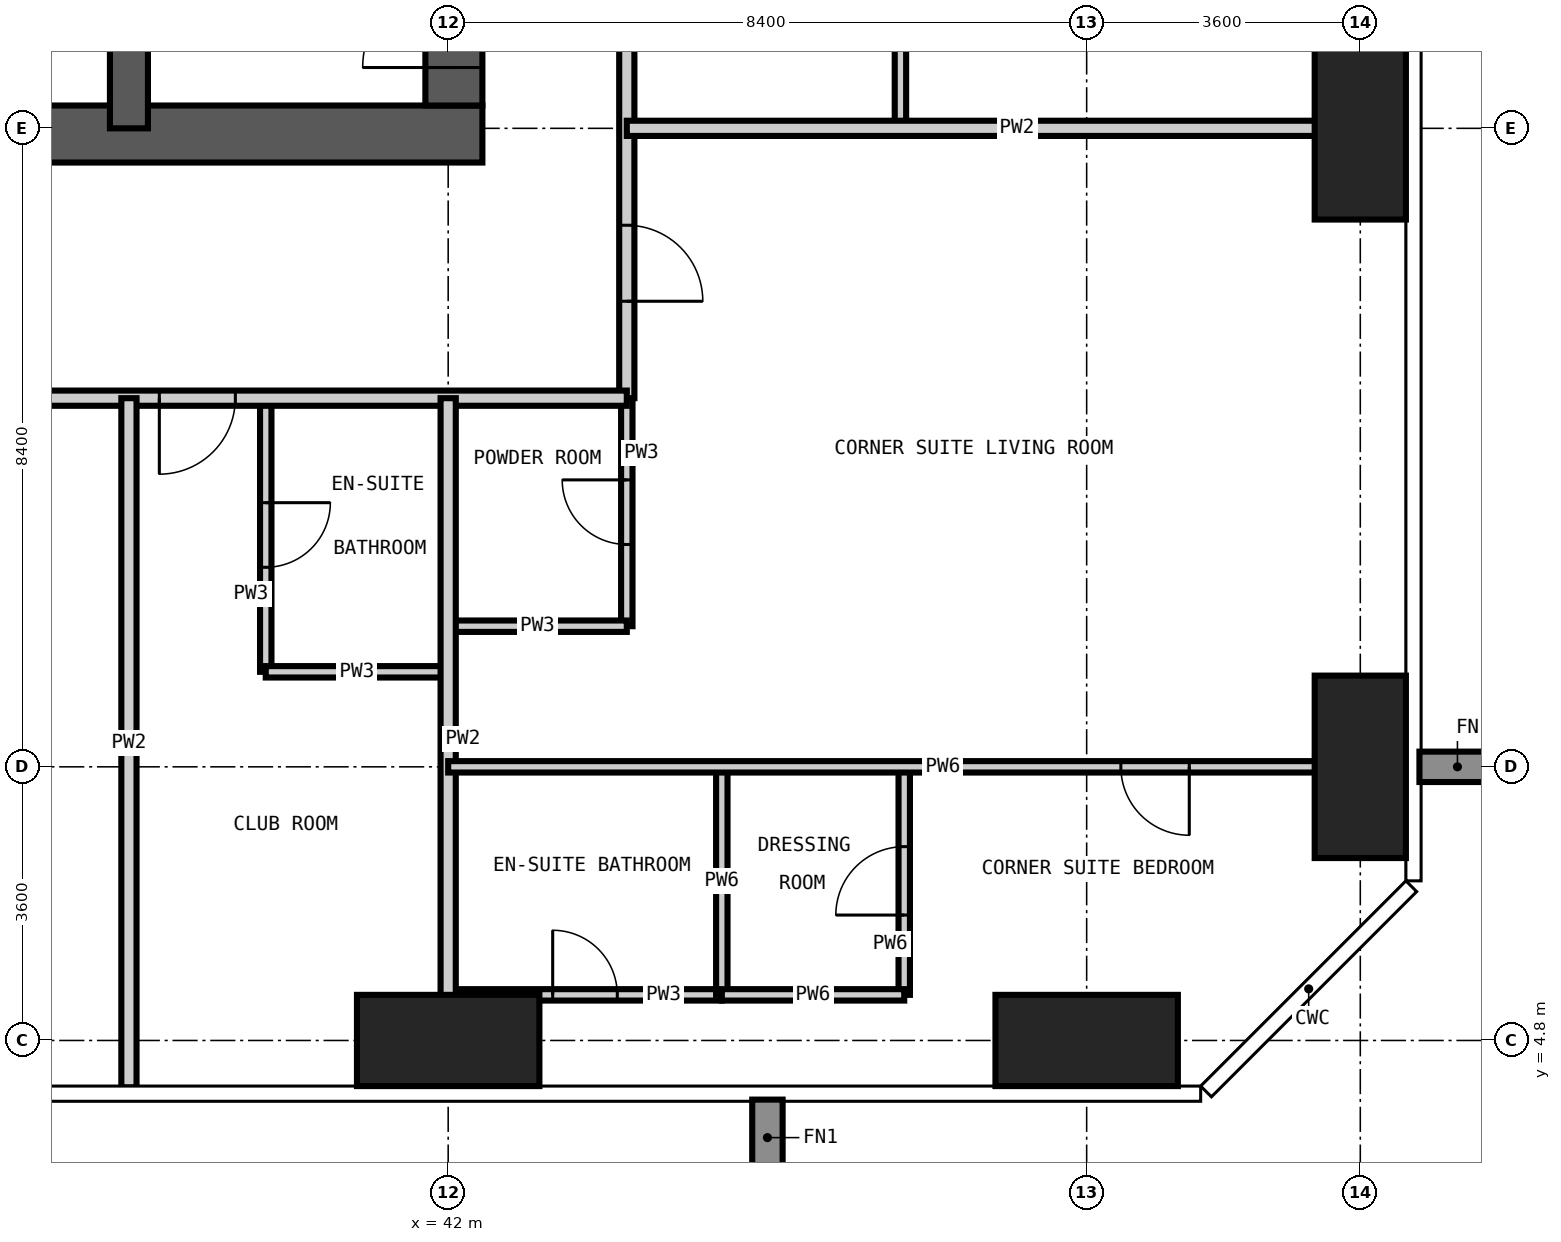
"""IFC4 building model, lengths in metres.
Left out: names, types, materials, properties, quantities, classifications, styles, units other than length and angle.
Written with IfcOpenShell. Run it as: python <this file> out.ifc"""

import sys

from ifc_helpers import new_model, si_unit, direction, frame, frame_2d, origin, origin_2d, place, context, subcontext, project, spatial, rectangle, extrude, element, fill, save


model = new_model("IFC4")
c1 = context("Model", 3, precision=1e-05, world=origin(), true_north=direction((0.0, 1.0)))
c2 = subcontext(c1, "Body", "Model", "MODEL_VIEW")
j1 = project(units=[si_unit("LENGTHUNIT", "METRE"), si_unit("PLANEANGLEUNIT", "RADIAN")], contexts=[c1])
p1 = place(None, origin())
s1 = spatial("IfcSite", under=j1, at=p1, CompositionType="ELEMENT")
p2 = place(p1, origin())
s2 = spatial("IfcBuilding", under=s1, at=p2, CompositionType="ELEMENT")
p3 = place(p2, frame((0.0, 0.0, 166.2)))
s3 = spatial("IfcBuildingStorey", under=s2, at=p3, CompositionType="ELEMENT", Elevation=166.2)
for number, where, z_axis, x_axis in (
    (1, (42.0, 4.8, -0.35), (0.0, 0.0, 1.0), (1.0, 0.0, 0.0)),
    (2, (50.4, 4.8, -0.35), (0.0, 0.0, 1.0), (1.0, 0.0, 0.0)),
):
    element("IfcColumn", number, at=place(p3, frame(where, z_axis=z_axis, x_axis=x_axis)), inside=s3, PredefinedType="COLUMN", context=c2, shape_type="SweptSolid", body=[
        extrude(rectangle(XDim=2.4, YDim=1.2, at=origin_2d()), origin(), (0.0, 0.0, 1.0), 3.6),
    ])
for number, where, z_axis, x_axis in (
    (3, (54.0, 8.4, -0.35), (0.0, 0.0, 1.0), (1.0, 0.0, 0.0)),
    (4, (54.0, 16.8, -0.35), (0.0, 0.0, 1.0), (1.0, 0.0, 0.0)),
):
    element("IfcColumn", number, at=place(p3, frame(where, z_axis=z_axis, x_axis=x_axis)), inside=s3, PredefinedType="COLUMN", context=c2, shape_type="SweptSolid", body=[
        extrude(rectangle(XDim=1.2, YDim=2.4, at=origin_2d()), origin(), (0.0, 0.0, 1.0), 3.6),
    ])
p4 = place(p3, frame((16.35, 16.725, -0.35), z_axis=(0.0, 0.0, 1.0), x_axis=(1.0, 0.0, 0.0)))
e5 = element("IfcWall", 5, at=p4, inside=s3, PredefinedType="SHEAR", context=c2, shape_type="SweptSolid", body=[
    extrude(rectangle(XDim=26.1, YDim=0.75, at=frame_2d((13.05, 0.0))), origin(), (0.0, 0.0, 1.0), 3.6),
])
p5 = place(p4, frame((12.55, 0.0, 0.35)))
e6 = element("IfcOpeningElement", 6, at=p5, cuts=e5, PredefinedType="OPENING", context=c2, shape_type="SweptSolid", body=[
    extrude(rectangle(XDim=1.0, YDim=2.1, at=frame_2d((0.5, 1.05))), frame((0.0, 0.385, 0.0), z_axis=(0.0, -1.0, 0.0), x_axis=(1.0, 0.0, 0.0)), (0.0, 0.0, 1.0), 0.77),
])
p6 = place(p4, frame((18.85, 0.0, 0.35)))
e7 = element("IfcOpeningElement", 7, at=p6, cuts=e5, PredefinedType="OPENING", context=c2, shape_type="SweptSolid", body=[
    extrude(rectangle(XDim=1.0, YDim=2.1, at=frame_2d((0.5, 1.05))), frame((0.0, 0.385, 0.0), z_axis=(0.0, -1.0, 0.0), x_axis=(1.0, 0.0, 0.0)), (0.0, 0.0, 1.0), 0.77),
])
p7 = place(p3, frame((42.075, 17.1, -0.35), z_axis=(0.0, 0.0, 1.0), x_axis=(0.0, 1.0, 0.0)))
e8 = element("IfcWall", 8, at=p7, inside=s3, PredefinedType="SHEAR", context=c2, shape_type="SweptSolid", body=[
    extrude(rectangle(XDim=24.6, YDim=0.75, at=frame_2d((12.3, 0.0))), origin(), (0.0, 0.0, 1.0), 3.6),
])
p8 = place(p7, frame((0.5, 0.0, 0.35)))
e9 = element("IfcOpeningElement", 9, at=p8, cuts=e8, PredefinedType="OPENING", context=c2, shape_type="SweptSolid", body=[
    extrude(rectangle(XDim=1.2, YDim=2.2, at=frame_2d((0.6, 1.1))), frame((0.0, 0.385, 0.0), z_axis=(0.0, -1.0, 0.0), x_axis=(1.0, 0.0, 0.0)), (0.0, 0.0, 1.0), 0.77),
])
p9 = place(p7, frame((11.8, 0.0, 0.35)))
e10 = element("IfcOpeningElement", 10, at=p9, cuts=e8, PredefinedType="OPENING", context=c2, shape_type="SweptSolid", body=[
    extrude(rectangle(XDim=1.0, YDim=2.1, at=frame_2d((0.5, 1.05))), frame((0.0, 0.385, 0.0), z_axis=(0.0, -1.0, 0.0), x_axis=(1.0, 0.0, 0.0)), (0.0, 0.0, 1.0), 0.77),
])
p10 = place(p7, frame((20.2, 0.0, 0.35)))
e11 = element("IfcOpeningElement", 11, at=p10, cuts=e8, PredefinedType="OPENING", context=c2, shape_type="SweptSolid", body=[
    extrude(rectangle(XDim=1.0, YDim=2.1, at=frame_2d((0.5, 1.05))), frame((0.0, 0.385, 0.0), z_axis=(0.0, -1.0, 0.0), x_axis=(1.0, 0.0, 0.0)), (0.0, 0.0, 1.0), 0.77),
])
p11 = place(p3, frame((37.8, 16.8, -0.35), z_axis=(0.0, 0.0, 1.0), x_axis=(0.0, 1.0, 0.0)))
e12 = element("IfcWall", 12, at=p11, inside=s3, PredefinedType="SHEAR", context=c2, shape_type="SweptSolid", body=[
    extrude(rectangle(XDim=11.2, YDim=0.5, at=frame_2d((5.6, 0.0))), origin(), (0.0, 0.0, 1.0), 3.6),
])
p12 = place(p3, frame((39.6, 9.65, 0.0), z_axis=(0.0, 0.0, 1.0), x_axis=(0.0, 1.0, 0.0)))
e13 = element("IfcWall", 13, at=p12, inside=s3, PredefinedType="PARTITIONING", context=c2, shape_type="SweptSolid", body=[
    extrude(rectangle(XDim=3.6, YDim=0.15, at=frame_2d((1.8, 0.0))), origin(), (0.0, 0.0, 1.0), 3.25),
])
p13 = place(p12, frame((1.375, 0.0, 0.0)))
e14 = element("IfcOpeningElement", 14, at=p13, cuts=e13, PredefinedType="OPENING", context=c2, shape_type="SweptSolid", body=[
    extrude(rectangle(XDim=0.85, YDim=2.1, at=frame_2d((0.425, 1.05))), frame((0.0, 0.085, 0.0), z_axis=(0.0, -1.0, 0.0), x_axis=(1.0, 0.0, 0.0)), (0.0, 0.0, 1.0), 0.17),
])
p14 = place(p3, frame((44.35, 10.25, 0.0), z_axis=(0.0, 0.0, 1.0), x_axis=(0.0, 1.0, 0.0)))
e15 = element("IfcWall", 15, at=p14, inside=s3, PredefinedType="PARTITIONING", context=c2, shape_type="SweptSolid", body=[
    extrude(rectangle(XDim=3.0, YDim=0.15, at=frame_2d((1.5, 0.0))), origin(), (0.0, 0.0, 1.0), 3.25),
])
p15 = place(p14, frame((1.075, 0.0, 0.0)))
e16 = element("IfcOpeningElement", 16, at=p15, cuts=e15, PredefinedType="OPENING", context=c2, shape_type="SweptSolid", body=[
    extrude(rectangle(XDim=0.85, YDim=2.1, at=frame_2d((0.425, 1.05))), frame((0.0, 0.085, 0.0), z_axis=(0.0, -1.0, 0.0), x_axis=(1.0, 0.0, 0.0)), (0.0, 0.0, 1.0), 0.17),
])
p16 = place(p3, frame((47.95, 16.8, 0.0), z_axis=(0.0, 0.0, 1.0), x_axis=(0.0, 1.0, 0.0)))
e17 = element("IfcWall", 17, at=p16, inside=s3, PredefinedType="PARTITIONING", context=c2, shape_type="SweptSolid", body=[
    extrude(rectangle(XDim=2.4, YDim=0.15, at=frame_2d((1.2, 0.0))), origin(), (0.0, 0.0, 1.0), 3.25),
])
p17 = place(p3, frame((42.0, 5.4, 0.0), z_axis=(0.0, 0.0, 1.0), x_axis=(1.0, 0.0, 0.0)))
e18 = element("IfcWall", 18, at=p17, inside=s3, PredefinedType="PARTITIONING", context=c2, shape_type="SweptSolid", body=[
    extrude(rectangle(XDim=3.6, YDim=0.15, at=frame_2d((1.8, 0.0))), origin(), (0.0, 0.0, 1.0), 3.25),
])
p18 = place(p17, frame((1.375, 0.0, 0.0)))
e19 = element("IfcOpeningElement", 19, at=p18, cuts=e18, PredefinedType="OPENING", context=c2, shape_type="SweptSolid", body=[
    extrude(rectangle(XDim=0.85, YDim=2.1, at=frame_2d((0.425, 1.05))), frame((0.0, 0.085, 0.0), z_axis=(0.0, -1.0, 0.0), x_axis=(1.0, 0.0, 0.0)), (0.0, 0.0, 1.0), 0.17),
])
p19 = place(p3, frame((39.6, 9.65, 0.0), z_axis=(0.0, 0.0, 1.0), x_axis=(1.0, 0.0, 0.0)))
e20 = element("IfcWall", 20, at=p19, inside=s3, PredefinedType="PARTITIONING", context=c2, shape_type="SweptSolid", body=[
    extrude(rectangle(XDim=2.4, YDim=0.15, at=frame_2d((1.2, 0.0))), origin(), (0.0, 0.0, 1.0), 3.25),
])
p20 = place(p3, frame((42.0, 10.25, 0.0), z_axis=(0.0, 0.0, 1.0), x_axis=(1.0, 0.0, 0.0)))
e21 = element("IfcWall", 21, at=p20, inside=s3, PredefinedType="PARTITIONING", context=c2, shape_type="SweptSolid", body=[
    extrude(rectangle(XDim=2.35, YDim=0.15, at=frame_2d((1.175, 0.0))), origin(), (0.0, 0.0, 1.0), 3.25),
])
p21 = place(p3, frame((44.35, 25.2, 0.0), z_axis=(0.0, 0.0, 1.0), x_axis=(0.0, -1.0, 0.0)))
e22 = element("IfcWall", 22, at=p21, inside=s3, PredefinedType="PARTITIONING", context=c2, shape_type="SweptSolid", body=[
    extrude(rectangle(XDim=11.95, YDim=0.2, at=frame_2d((5.975, 0.0))), origin(), (0.0, 0.0, 1.0), 3.25),
])
p22 = place(p21, frame((4.6, 0.0, 0.0)))
e23 = element("IfcOpeningElement", 23, at=p22, cuts=e22, PredefinedType="OPENING", context=c2, shape_type="SweptSolid", body=[
    extrude(rectangle(XDim=1.0, YDim=2.2, at=frame_2d((0.5, 1.1))), frame((0.0, 0.11, 0.0), z_axis=(0.0, -1.0, 0.0), x_axis=(1.0, 0.0, 0.0)), (0.0, 0.0, 1.0), 0.22),
])
p23 = place(p21, frame((2.8, 0.0, 0.0)))
e24 = element("IfcOpeningElement", 24, at=p23, cuts=e22, PredefinedType="OPENING", context=c2, shape_type="SweptSolid", body=[
    extrude(rectangle(XDim=1.0, YDim=2.2, at=frame_2d((0.5, 1.1))), frame((0.0, 0.11, 0.0), z_axis=(0.0, -1.0, 0.0), x_axis=(1.0, 0.0, 0.0)), (0.0, 0.0, 1.0), 0.22),
])
p24 = place(p21, frame((9.675, 0.0, 0.0)))
e25 = element("IfcOpeningElement", 25, at=p24, cuts=e22, PredefinedType="OPENING", context=c2, shape_type="SweptSolid", body=[
    extrude(rectangle(XDim=1.0, YDim=2.2, at=frame_2d((0.5, 1.1))), frame((0.0, 0.11, 0.0), z_axis=(0.0, -1.0, 0.0), x_axis=(1.0, 0.0, 0.0)), (0.0, 0.0, 1.0), 0.22),
])
p25 = place(p3, frame((44.35, 13.25, 0.0), z_axis=(0.0, 0.0, 1.0), x_axis=(-1.0, 0.0, 0.0)))
e26 = element("IfcWall", 26, at=p25, inside=s3, PredefinedType="PARTITIONING", context=c2, shape_type="SweptSolid", body=[
    extrude(rectangle(XDim=31.1, YDim=0.2, at=frame_2d((15.55, 0.0))), origin(), (0.0, 0.0, 1.0), 3.25),
])
p26 = place(p25, frame((23.75, 0.0, 0.0)))
e27 = element("IfcOpeningElement", 27, at=p26, cuts=e26, PredefinedType="OPENING", context=c2, shape_type="SweptSolid", body=[
    extrude(rectangle(XDim=1.0, YDim=2.2, at=frame_2d((0.5, 1.1))), frame((0.0, 0.11, 0.0), z_axis=(0.0, -1.0, 0.0), x_axis=(1.0, 0.0, 0.0)), (0.0, 0.0, 1.0), 0.22),
])
p27 = place(p25, frame((20.0, 0.0, 0.0)))
e28 = element("IfcOpeningElement", 28, at=p27, cuts=e26, PredefinedType="OPENING", context=c2, shape_type="SweptSolid", body=[
    extrude(rectangle(XDim=1.0, YDim=2.2, at=frame_2d((0.5, 1.1))), frame((0.0, 0.11, 0.0), z_axis=(0.0, -1.0, 0.0), x_axis=(1.0, 0.0, 0.0)), (0.0, 0.0, 1.0), 0.22),
])
p28 = place(p25, frame((8.9, 0.0, 0.0)))
e29 = element("IfcOpeningElement", 29, at=p28, cuts=e26, PredefinedType="OPENING", context=c2, shape_type="SweptSolid", body=[
    extrude(rectangle(XDim=1.0, YDim=2.2, at=frame_2d((0.5, 1.1))), frame((0.0, 0.11, 0.0), z_axis=(0.0, -1.0, 0.0), x_axis=(1.0, 0.0, 0.0)), (0.0, 0.0, 1.0), 0.22),
])
p29 = place(p25, frame((5.15, 0.0, 0.0)))
e30 = element("IfcOpeningElement", 30, at=p29, cuts=e26, PredefinedType="OPENING", context=c2, shape_type="SweptSolid", body=[
    extrude(rectangle(XDim=1.0, YDim=2.2, at=frame_2d((0.5, 1.1))), frame((0.0, 0.11, 0.0), z_axis=(0.0, -1.0, 0.0), x_axis=(1.0, 0.0, 0.0)), (0.0, 0.0, 1.0), 0.22),
])
for number, where, z_axis, x_axis in (
    (31, (37.8, 4.182, 0.0), (0.0, 0.0, 1.0), (0.0, 1.0, 0.0)),
    (32, (42.0, 4.182, 0.0), (0.0, 0.0, 1.0), (0.0, 1.0, 0.0)),
):
    element("IfcWall", number, at=place(p3, frame(where, z_axis=z_axis, x_axis=x_axis)), inside=s3, PredefinedType="PARTITIONING", context=c2, shape_type="SweptSolid", body=[
        extrude(rectangle(XDim=9.068, YDim=0.2, at=frame_2d((4.534, 0.0))), origin(), (0.0, 0.0, 1.0), 3.25),
    ])
p30 = place(p3, frame((44.35, 16.8, 0.0), z_axis=(0.0, 0.0, 1.0), x_axis=(1.0, 0.0, 0.0)))
e33 = element("IfcWall", 33, at=p30, inside=s3, PredefinedType="PARTITIONING", context=c2, shape_type="SweptSolid", body=[
    extrude(rectangle(XDim=10.268, YDim=0.2, at=frame_2d((5.134, 0.0))), origin(), (0.0, 0.0, 1.0), 3.25),
])
p31 = place(p3, frame((45.6, 5.4, 0.0), z_axis=(0.0, 0.0, 1.0), x_axis=(0.0, 1.0, 0.0)))
e34 = element("IfcWall", 34, at=p31, inside=s3, PredefinedType="PARTITIONING", context=c2, shape_type="SweptSolid", body=[
    extrude(rectangle(XDim=3.0, YDim=0.15, at=frame_2d((1.5, 0.0))), origin(), (0.0, 0.0, 1.0), 3.25),
])
p32 = place(p3, frame((48.0, 5.4, 0.0), z_axis=(0.0, 0.0, 1.0), x_axis=(0.0, 1.0, 0.0)))
e35 = element("IfcWall", 35, at=p32, inside=s3, PredefinedType="PARTITIONING", context=c2, shape_type="SweptSolid", body=[
    extrude(rectangle(XDim=3.0, YDim=0.15, at=frame_2d((1.5, 0.0))), origin(), (0.0, 0.0, 1.0), 3.25),
])
p33 = place(p32, frame((1.05, 0.0, 0.0)))
e36 = element("IfcOpeningElement", 36, at=p33, cuts=e35, PredefinedType="OPENING", context=c2, shape_type="SweptSolid", body=[
    extrude(rectangle(XDim=0.9, YDim=2.1, at=frame_2d((0.45, 1.05))), frame((0.0, 0.085, 0.0), z_axis=(0.0, -1.0, 0.0), x_axis=(1.0, 0.0, 0.0)), (0.0, 0.0, 1.0), 0.17),
])
p34 = place(p3, frame((45.6, 5.4, 0.0), z_axis=(0.0, 0.0, 1.0), x_axis=(1.0, 0.0, 0.0)))
e37 = element("IfcWall", 37, at=p34, inside=s3, PredefinedType="PARTITIONING", context=c2, shape_type="SweptSolid", body=[
    extrude(rectangle(XDim=2.4, YDim=0.15, at=frame_2d((1.2, 0.0))), origin(), (0.0, 0.0, 1.0), 3.25),
])
p35 = place(p3, frame((42.0, 8.4, 0.0), z_axis=(0.0, 0.0, 1.0), x_axis=(1.0, 0.0, 0.0)))
e38 = element("IfcWall", 38, at=p35, inside=s3, PredefinedType="PARTITIONING", context=c2, shape_type="SweptSolid", body=[
    extrude(rectangle(XDim=12.618, YDim=0.15, at=frame_2d((6.309, 0.0))), origin(), (0.0, 0.0, 1.0), 3.25),
])
p36 = place(p35, frame((8.85, 0.0, 0.0)))
e39 = element("IfcOpeningElement", 39, at=p36, cuts=e38, PredefinedType="OPENING", context=c2, shape_type="SweptSolid", body=[
    extrude(rectangle(XDim=0.9, YDim=2.1, at=frame_2d((0.45, 1.05))), frame((0.0, 0.085, 0.0), z_axis=(0.0, -1.0, 0.0), x_axis=(1.0, 0.0, 0.0)), (0.0, 0.0, 1.0), 0.17),
])
p37 = place(p8, origin())
e40 = element("IfcDoor", 40, at=p37, inside=s3, OperationType="SINGLE_SWING_LEFT", PredefinedType="DOOR", context=c2, shape_type="SweptSolid", body=[
    extrude(rectangle(XDim=1.2, YDim=2.2, at=frame_2d((0.6, 1.1))), frame((0.0, 0.025, 0.0), z_axis=(0.0, -1.0, 0.0), x_axis=(1.0, 0.0, 0.0)), (0.0, 0.0, 1.0), 0.05),
])
fill(e9, e40)
p38 = place(p29, origin())
e41 = element("IfcDoor", 41, at=p38, inside=s3, OperationType="SINGLE_SWING_RIGHT", PredefinedType="DOOR", context=c2, shape_type="SweptSolid", body=[
    extrude(rectangle(XDim=1.0, YDim=2.2, at=frame_2d((0.5, 1.1))), frame((0.0, 0.025, 0.0), z_axis=(0.0, -1.0, 0.0), x_axis=(1.0, 0.0, 0.0)), (0.0, 0.0, 1.0), 0.05),
])
fill(e30, e41)
p39 = place(p13, frame((0.85, 0.0, 0.0), z_axis=(0.0, 0.0, 1.0), x_axis=(-1.0, 0.0, 0.0)))
e42 = element("IfcDoor", 42, at=p39, inside=s3, OperationType="SINGLE_SWING_LEFT", PredefinedType="DOOR", context=c2, shape_type="SweptSolid", body=[
    extrude(rectangle(XDim=0.85, YDim=2.1, at=frame_2d((0.425, 1.05))), frame((0.0, 0.025, 0.0), z_axis=(0.0, -1.0, 0.0), x_axis=(1.0, 0.0, 0.0)), (0.0, 0.0, 1.0), 0.05),
])
fill(e14, e42)
p40 = place(p24, origin())
e43 = element("IfcDoor", 43, at=p40, inside=s3, OperationType="SINGLE_SWING_RIGHT", PredefinedType="DOOR", context=c2, shape_type="SweptSolid", body=[
    extrude(rectangle(XDim=1.0, YDim=2.2, at=frame_2d((0.5, 1.1))), frame((0.0, 0.025, 0.0), z_axis=(0.0, -1.0, 0.0), x_axis=(1.0, 0.0, 0.0)), (0.0, 0.0, 1.0), 0.05),
])
fill(e25, e43)
p41 = place(p15, origin())
e44 = element("IfcDoor", 44, at=p41, inside=s3, OperationType="SINGLE_SWING_RIGHT", PredefinedType="DOOR", context=c2, shape_type="SweptSolid", body=[
    extrude(rectangle(XDim=0.85, YDim=2.1, at=frame_2d((0.425, 1.05))), frame((0.0, 0.025, 0.0), z_axis=(0.0, -1.0, 0.0), x_axis=(1.0, 0.0, 0.0)), (0.0, 0.0, 1.0), 0.05),
])
fill(e16, e44)
p42 = place(p36, frame((0.9, 0.0, 0.0), z_axis=(0.0, 0.0, 1.0), x_axis=(-1.0, 0.0, 0.0)))
e45 = element("IfcDoor", 45, at=p42, inside=s3, OperationType="SINGLE_SWING_LEFT", PredefinedType="DOOR", context=c2, shape_type="SweptSolid", body=[
    extrude(rectangle(XDim=0.9, YDim=2.1, at=frame_2d((0.45, 1.05))), frame((0.0, 0.025, 0.0), z_axis=(0.0, -1.0, 0.0), x_axis=(1.0, 0.0, 0.0)), (0.0, 0.0, 1.0), 0.05),
])
fill(e39, e45)
p43 = place(p18, origin())
e46 = element("IfcDoor", 46, at=p43, inside=s3, OperationType="SINGLE_SWING_LEFT", PredefinedType="DOOR", context=c2, shape_type="SweptSolid", body=[
    extrude(rectangle(XDim=0.85, YDim=2.1, at=frame_2d((0.425, 1.05))), frame((0.0, 0.025, 0.0), z_axis=(0.0, -1.0, 0.0), x_axis=(1.0, 0.0, 0.0)), (0.0, 0.0, 1.0), 0.05),
])
fill(e19, e46)
p44 = place(p33, origin())
e47 = element("IfcDoor", 47, at=p44, inside=s3, OperationType="SINGLE_SWING_LEFT", PredefinedType="DOOR", context=c2, shape_type="SweptSolid", body=[
    extrude(rectangle(XDim=0.9, YDim=2.1, at=frame_2d((0.45, 1.05))), frame((0.0, 0.025, 0.0), z_axis=(0.0, -1.0, 0.0), x_axis=(1.0, 0.0, 0.0)), (0.0, 0.0, 1.0), 0.05),
])
fill(e36, e47)
save(model, sys.argv[1])
